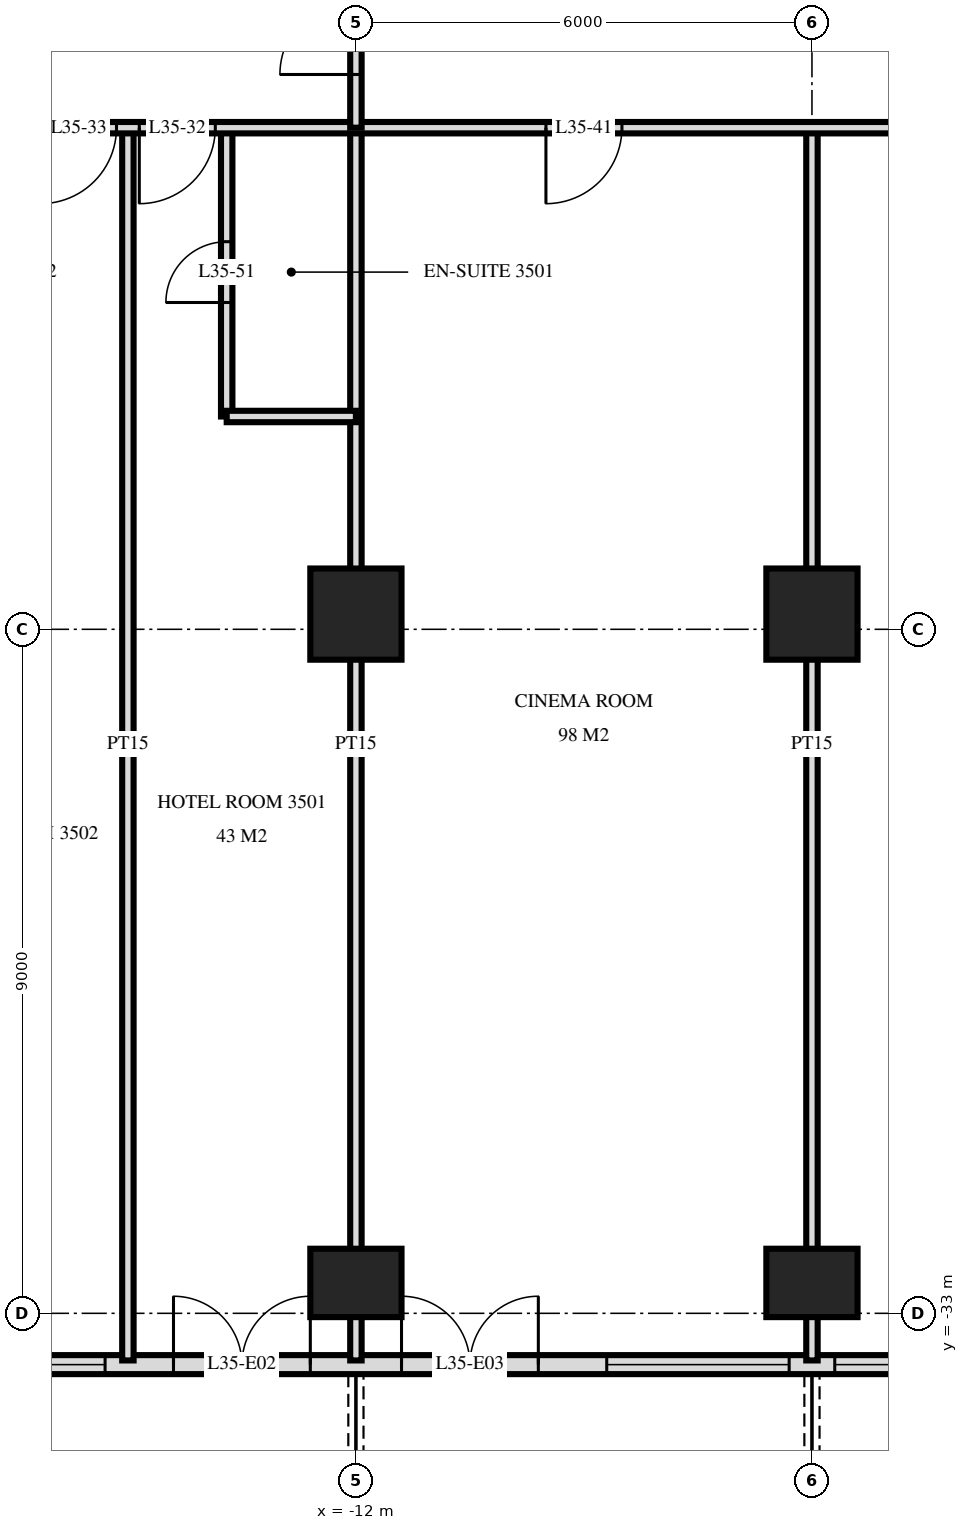
"""IFC4 building model, lengths in metres.
Left out: names, types, materials, properties, quantities, classifications, styles, units other than length and angle.
Written with IfcOpenShell. Run it as: python <this file> out.ifc"""

import sys

from ifc_helpers import new_model, si_unit, direction, frame, frame_2d, origin, origin_2d, place, context, subcontext, project, spatial, rectangle, extrude, element, fill, save


model = new_model("IFC4")
c1 = context("Model", 3, precision=1e-05, world=origin(), true_north=direction((0.0, 1.0)))
c2 = subcontext(c1, "Body", "Model", "MODEL_VIEW")
j1 = project(units=[si_unit("LENGTHUNIT", "METRE"), si_unit("PLANEANGLEUNIT", "RADIAN")], contexts=[c1])
p1 = place(None, origin())
s1 = spatial("IfcSite", under=j1, at=p1, CompositionType="ELEMENT")
p2 = place(p1, origin())
s2 = spatial("IfcBuilding", under=s1, at=p2, CompositionType="ELEMENT")
p3 = place(p2, frame((0.0, 0.0, 138.0)))
s3 = spatial("IfcBuildingStorey", under=s2, at=p3, CompositionType="ELEMENT", Elevation=138.0)
p4 = place(p3, frame((-12.0, -32.6, 0.0), z_axis=(0.0, 0.0, 1.0), x_axis=(1.0, 0.0, 0.0)))
e1 = element("IfcColumn", 1, at=p4, inside=s3, PredefinedType="COLUMN", context=c2, shape_type="SweptSolid", body=[
    extrude(rectangle(XDim=1.2, YDim=0.9, at=origin_2d()), origin(), (0.0, 0.0, 1.0), 3.6),
])
p5 = place(p3, frame((-12.0, -23.8, 0.0), z_axis=(0.0, 0.0, 1.0), x_axis=(1.0, 0.0, 0.0)))
e2 = element("IfcColumn", 2, at=p5, inside=s3, PredefinedType="COLUMN", context=c2, shape_type="SweptSolid", body=[
    extrude(rectangle(XDim=1.2, YDim=1.2, at=origin_2d()), origin(), (0.0, 0.0, 1.0), 3.6),
])
p6 = place(p3, frame((-6.0, -32.6, 0.0), z_axis=(0.0, 0.0, 1.0), x_axis=(1.0, 0.0, 0.0)))
e3 = element("IfcColumn", 3, at=p6, inside=s3, PredefinedType="COLUMN", context=c2, shape_type="SweptSolid", body=[
    extrude(rectangle(XDim=1.2, YDim=0.9, at=origin_2d()), origin(), (0.0, 0.0, 1.0), 3.6),
])
p7 = place(p3, frame((-6.0, -23.8, 0.0), z_axis=(0.0, 0.0, 1.0), x_axis=(1.0, 0.0, 0.0)))
e4 = element("IfcColumn", 4, at=p7, inside=s3, PredefinedType="COLUMN", context=c2, shape_type="SweptSolid", body=[
    extrude(rectangle(XDim=1.2, YDim=1.2, at=origin_2d()), origin(), (0.0, 0.0, 1.0), 3.6),
])
p8 = place(p3, frame((-23.675, -33.675, 0.0), z_axis=(0.0, 0.0, 1.0), x_axis=(1.0, 0.0, 0.0)))
e5 = element("IfcWall", 5, at=p8, inside=s3, PredefinedType="SOLIDWALL", context=c2, shape_type="SweptSolid", body=[
    extrude(rectangle(XDim=47.351, YDim=0.25, at=frame_2d((23.675, 0.0))), origin(), (0.0, 0.0, 1.0), 3.32),
])
p9 = place(p8, frame((0.575, 0.0, 0.0)))
e6 = element("IfcOpeningElement", 6, at=p9, cuts=e5, PredefinedType="OPENING", context=c2, shape_type="SweptSolid", body=[
    extrude(rectangle(XDim=1.8, YDim=2.4, at=frame_2d((0.9, 1.2))), frame((0.0, 0.135, 0.0), z_axis=(0.0, -1.0, 0.0), x_axis=(1.0, 0.0, 0.0)), (0.0, 0.0, 1.0), 0.27),
])
p10 = place(p8, frame((3.425, 0.0, 0.3)))
e7 = element("IfcOpeningElement", 7, at=p10, cuts=e5, PredefinedType="OPENING", context=c2, shape_type="SweptSolid", body=[
    extrude(rectangle(XDim=1.8, YDim=2.1, at=frame_2d((0.9, 1.05))), frame((0.0, 0.135, 0.0), z_axis=(0.0, -1.0, 0.0), x_axis=(1.0, 0.0, 0.0)), (0.0, 0.0, 1.0), 0.27),
])
p11 = place(p8, frame((5.975, 0.0, 0.3)))
e8 = element("IfcOpeningElement", 8, at=p11, cuts=e5, PredefinedType="OPENING", context=c2, shape_type="SweptSolid", body=[
    extrude(rectangle(XDim=2.4, YDim=2.1, at=frame_2d((1.2, 1.05))), frame((0.0, 0.135, 0.0), z_axis=(0.0, -1.0, 0.0), x_axis=(1.0, 0.0, 0.0)), (0.0, 0.0, 1.0), 0.27),
])
p12 = place(p8, frame((9.275, 0.0, 0.0)))
e9 = element("IfcOpeningElement", 9, at=p12, cuts=e5, PredefinedType="OPENING", context=c2, shape_type="SweptSolid", body=[
    extrude(rectangle(XDim=1.8, YDim=2.4, at=frame_2d((0.9, 1.2))), frame((0.0, 0.135, 0.0), z_axis=(0.0, -1.0, 0.0), x_axis=(1.0, 0.0, 0.0)), (0.0, 0.0, 1.0), 0.27),
])
p13 = place(p8, frame((12.275, 0.0, 0.0)))
e10 = element("IfcOpeningElement", 10, at=p13, cuts=e5, PredefinedType="OPENING", context=c2, shape_type="SweptSolid", body=[
    extrude(rectangle(XDim=1.8, YDim=2.4, at=frame_2d((0.9, 1.2))), frame((0.0, 0.135, 0.0), z_axis=(0.0, -1.0, 0.0), x_axis=(1.0, 0.0, 0.0)), (0.0, 0.0, 1.0), 0.27),
])
p14 = place(p8, frame((14.975, 0.0, 0.3)))
e11 = element("IfcOpeningElement", 11, at=p14, cuts=e5, PredefinedType="OPENING", context=c2, shape_type="SweptSolid", body=[
    extrude(rectangle(XDim=2.4, YDim=2.1, at=frame_2d((1.2, 1.05))), frame((0.0, 0.135, 0.0), z_axis=(0.0, -1.0, 0.0), x_axis=(1.0, 0.0, 0.0)), (0.0, 0.0, 1.0), 0.27),
])
p15 = place(p8, frame((17.975, 0.0, 0.3)))
e12 = element("IfcOpeningElement", 12, at=p15, cuts=e5, PredefinedType="OPENING", context=c2, shape_type="SweptSolid", body=[
    extrude(rectangle(XDim=2.4, YDim=2.1, at=frame_2d((1.2, 1.05))), frame((0.0, 0.135, 0.0), z_axis=(0.0, -1.0, 0.0), x_axis=(1.0, 0.0, 0.0)), (0.0, 0.0, 1.0), 0.27),
])
p16 = place(p8, frame((21.275, 0.0, 0.0)))
e13 = element("IfcOpeningElement", 13, at=p16, cuts=e5, PredefinedType="OPENING", context=c2, shape_type="SweptSolid", body=[
    extrude(rectangle(XDim=1.8, YDim=2.4, at=frame_2d((0.9, 1.2))), frame((0.0, 0.135, 0.0), z_axis=(0.0, -1.0, 0.0), x_axis=(1.0, 0.0, 0.0)), (0.0, 0.0, 1.0), 0.27),
])
p17 = place(p8, frame((24.275, 0.0, 0.0)))
e14 = element("IfcOpeningElement", 14, at=p17, cuts=e5, PredefinedType="OPENING", context=c2, shape_type="SweptSolid", body=[
    extrude(rectangle(XDim=1.8, YDim=2.4, at=frame_2d((0.9, 1.2))), frame((0.0, 0.135, 0.0), z_axis=(0.0, -1.0, 0.0), x_axis=(1.0, 0.0, 0.0)), (0.0, 0.0, 1.0), 0.27),
])
p18 = place(p8, frame((26.975, 0.0, 0.3)))
e15 = element("IfcOpeningElement", 15, at=p18, cuts=e5, PredefinedType="OPENING", context=c2, shape_type="SweptSolid", body=[
    extrude(rectangle(XDim=2.4, YDim=2.1, at=frame_2d((1.2, 1.05))), frame((0.0, 0.135, 0.0), z_axis=(0.0, -1.0, 0.0), x_axis=(1.0, 0.0, 0.0)), (0.0, 0.0, 1.0), 0.27),
])
p19 = place(p8, frame((30.275, 0.0, 0.0)))
e16 = element("IfcOpeningElement", 16, at=p19, cuts=e5, PredefinedType="OPENING", context=c2, shape_type="SweptSolid", body=[
    extrude(rectangle(XDim=1.8, YDim=2.4, at=frame_2d((0.9, 1.2))), frame((0.0, 0.135, 0.0), z_axis=(0.0, -1.0, 0.0), x_axis=(1.0, 0.0, 0.0)), (0.0, 0.0, 1.0), 0.27),
])
p20 = place(p8, frame((32.975, 0.0, 0.3)))
e17 = element("IfcOpeningElement", 17, at=p20, cuts=e5, PredefinedType="OPENING", context=c2, shape_type="SweptSolid", body=[
    extrude(rectangle(XDim=2.4, YDim=2.1, at=frame_2d((1.2, 1.05))), frame((0.0, 0.135, 0.0), z_axis=(0.0, -1.0, 0.0), x_axis=(1.0, 0.0, 0.0)), (0.0, 0.0, 1.0), 0.27),
])
p21 = place(p8, frame((36.275, 0.0, 0.0)))
e18 = element("IfcOpeningElement", 18, at=p21, cuts=e5, PredefinedType="OPENING", context=c2, shape_type="SweptSolid", body=[
    extrude(rectangle(XDim=1.8, YDim=2.4, at=frame_2d((0.9, 1.2))), frame((0.0, 0.135, 0.0), z_axis=(0.0, -1.0, 0.0), x_axis=(1.0, 0.0, 0.0)), (0.0, 0.0, 1.0), 0.27),
])
p22 = place(p8, frame((38.975, 0.0, 0.3)))
e19 = element("IfcOpeningElement", 19, at=p22, cuts=e5, PredefinedType="OPENING", context=c2, shape_type="SweptSolid", body=[
    extrude(rectangle(XDim=2.4, YDim=2.1, at=frame_2d((1.2, 1.05))), frame((0.0, 0.135, 0.0), z_axis=(0.0, -1.0, 0.0), x_axis=(1.0, 0.0, 0.0)), (0.0, 0.0, 1.0), 0.27),
])
p23 = place(p8, frame((42.275, 0.0, 0.0)))
e20 = element("IfcOpeningElement", 20, at=p23, cuts=e5, PredefinedType="OPENING", context=c2, shape_type="SweptSolid", body=[
    extrude(rectangle(XDim=1.8, YDim=2.4, at=frame_2d((0.9, 1.2))), frame((0.0, 0.135, 0.0), z_axis=(0.0, -1.0, 0.0), x_axis=(1.0, 0.0, 0.0)), (0.0, 0.0, 1.0), 0.27),
])
p24 = place(p8, frame((45.125, 0.0, 0.3)))
e21 = element("IfcOpeningElement", 21, at=p24, cuts=e5, PredefinedType="OPENING", context=c2, shape_type="SweptSolid", body=[
    extrude(rectangle(XDim=1.8, YDim=2.1, at=frame_2d((0.9, 1.05))), frame((0.0, 0.135, 0.0), z_axis=(0.0, -1.0, 0.0), x_axis=(1.0, 0.0, 0.0)), (0.0, 0.0, 1.0), 0.27),
])
p25 = place(p3, frame((-6.0, -33.62, 0.0), z_axis=(0.0, 0.0, 1.0), x_axis=(0.0, 1.0, 0.0)))
e22 = element("IfcWall", 22, at=p25, inside=s3, PredefinedType="PARTITIONING", context=c2, shape_type="SweptSolid", body=[
    extrude(rectangle(XDim=16.22, YDim=0.15, at=frame_2d((8.11, 0.0))), origin(), (0.0, 0.0, 1.0), 3.32),
])
p26 = place(p3, frame((-12.0, -17.4, 0.0), z_axis=(0.0, 0.0, 1.0), x_axis=(0.0, 1.0, 0.0)))
e23 = element("IfcWall", 23, at=p26, inside=s3, PredefinedType="PARTITIONING", context=c2, shape_type="SweptSolid", body=[
    extrude(rectangle(XDim=2.35, YDim=0.15, at=frame_2d((1.175, 0.0))), origin(), (0.0, 0.0, 1.0), 3.32),
])
p27 = place(p26, frame((0.7, 0.0, 0.0)))
e24 = element("IfcOpeningElement", 24, at=p27, cuts=e23, PredefinedType="OPENING", context=c2, shape_type="SweptSolid", body=[
    extrude(rectangle(XDim=1.0, YDim=2.1, at=frame_2d((0.5, 1.05))), frame((0.0, 0.085, 0.0), z_axis=(0.0, -1.0, 0.0), x_axis=(1.0, 0.0, 0.0)), (0.0, 0.0, 1.0), 0.17),
])
p28 = place(p3, frame((-12.0, -33.62, 0.0), z_axis=(0.0, 0.0, 1.0), x_axis=(0.0, 1.0, 0.0)))
e25 = element("IfcWall", 25, at=p28, inside=s3, PredefinedType="PARTITIONING", context=c2, shape_type="SweptSolid", body=[
    extrude(rectangle(XDim=16.22, YDim=0.15, at=frame_2d((8.11, 0.0))), origin(), (0.0, 0.0, 1.0), 3.32),
])
p29 = place(p3, frame((-13.7, -21.2, 0.0), z_axis=(0.0, 0.0, 1.0), x_axis=(0.0, 1.0, 0.0)))
e26 = element("IfcWall", 26, at=p29, inside=s3, PredefinedType="PARTITIONING", context=c2, shape_type="SweptSolid", body=[
    extrude(rectangle(XDim=3.8, YDim=0.15, at=frame_2d((1.9, 0.0))), origin(), (0.0, 0.0, 1.0), 3.32),
])
p30 = place(p29, frame((1.5, 0.0, 0.0)))
e27 = element("IfcOpeningElement", 27, at=p30, cuts=e26, PredefinedType="OPENING", context=c2, shape_type="SweptSolid", body=[
    extrude(rectangle(XDim=0.8, YDim=2.1, at=frame_2d((0.4, 1.05))), frame((0.0, 0.085, 0.0), z_axis=(0.0, -1.0, 0.0), x_axis=(1.0, 0.0, 0.0)), (0.0, 0.0, 1.0), 0.17),
])
p31 = place(p3, frame((-15.0, -33.62, 0.0), z_axis=(0.0, 0.0, 1.0), x_axis=(0.0, 1.0, 0.0)))
e28 = element("IfcWall", 28, at=p31, inside=s3, PredefinedType="PARTITIONING", context=c2, shape_type="SweptSolid", body=[
    extrude(rectangle(XDim=16.22, YDim=0.15, at=frame_2d((8.11, 0.0))), origin(), (0.0, 0.0, 1.0), 3.32),
])
p32 = place(p3, frame((-13.7, -21.2, 0.0), z_axis=(0.0, 0.0, 1.0), x_axis=(1.0, 0.0, 0.0)))
e29 = element("IfcWall", 29, at=p32, inside=s3, PredefinedType="PARTITIONING", context=c2, shape_type="SweptSolid", body=[
    extrude(rectangle(XDim=1.7, YDim=0.15, at=frame_2d((0.85, 0.0))), origin(), (0.0, 0.0, 1.0), 3.32),
])
p33 = place(p3, frame((-28.02, -17.4, 0.0), z_axis=(0.0, 0.0, 1.0), x_axis=(1.0, 0.0, 0.0)))
e30 = element("IfcWall", 30, at=p33, inside=s3, PredefinedType="PARTITIONING", context=c2, shape_type="SweptSolid", body=[
    extrude(rectangle(XDim=56.04, YDim=0.15, at=frame_2d((28.02, 0.0))), origin(), (0.0, 0.0, 1.0), 3.32),
])
p34 = place(p33, frame((13.17, 0.0, 0.0)))
e31 = element("IfcOpeningElement", 31, at=p34, cuts=e30, PredefinedType="OPENING", context=c2, shape_type="SweptSolid", body=[
    extrude(rectangle(XDim=1.0, YDim=2.1, at=frame_2d((0.5, 1.05))), frame((0.0, 0.085, 0.0), z_axis=(0.0, -1.0, 0.0), x_axis=(1.0, 0.0, 0.0)), (0.0, 0.0, 1.0), 0.17),
])
p35 = place(p33, frame((11.87, 0.0, 0.0)))
e32 = element("IfcOpeningElement", 32, at=p35, cuts=e30, PredefinedType="OPENING", context=c2, shape_type="SweptSolid", body=[
    extrude(rectangle(XDim=1.0, YDim=2.1, at=frame_2d((0.5, 1.05))), frame((0.0, 0.085, 0.0), z_axis=(0.0, -1.0, 0.0), x_axis=(1.0, 0.0, 0.0)), (0.0, 0.0, 1.0), 0.17),
])
p36 = place(p33, frame((2.32, 0.0, 0.0)))
e33 = element("IfcOpeningElement", 33, at=p36, cuts=e30, PredefinedType="OPENING", context=c2, shape_type="SweptSolid", body=[
    extrude(rectangle(XDim=1.0, YDim=2.1, at=frame_2d((0.5, 1.05))), frame((0.0, 0.085, 0.0), z_axis=(0.0, -1.0, 0.0), x_axis=(1.0, 0.0, 0.0)), (0.0, 0.0, 1.0), 0.17),
])
p37 = place(p33, frame((40.17, 0.0, 0.0)))
e34 = element("IfcOpeningElement", 34, at=p37, cuts=e30, PredefinedType="OPENING", context=c2, shape_type="SweptSolid", body=[
    extrude(rectangle(XDim=1.0, YDim=2.1, at=frame_2d((0.5, 1.05))), frame((0.0, 0.085, 0.0), z_axis=(0.0, -1.0, 0.0), x_axis=(1.0, 0.0, 0.0)), (0.0, 0.0, 1.0), 0.17),
])
p38 = place(p33, frame((51.22, 0.0, 0.0)))
e35 = element("IfcOpeningElement", 35, at=p38, cuts=e30, PredefinedType="OPENING", context=c2, shape_type="SweptSolid", body=[
    extrude(rectangle(XDim=1.0, YDim=2.1, at=frame_2d((0.5, 1.05))), frame((0.0, 0.085, 0.0), z_axis=(0.0, -1.0, 0.0), x_axis=(1.0, 0.0, 0.0)), (0.0, 0.0, 1.0), 0.17),
])
p39 = place(p33, frame((18.52, 0.0, 0.0)))
e36 = element("IfcOpeningElement", 36, at=p39, cuts=e30, PredefinedType="OPENING", context=c2, shape_type="SweptSolid", body=[
    extrude(rectangle(XDim=1.0, YDim=2.1, at=frame_2d((0.5, 1.05))), frame((0.0, 0.085, 0.0), z_axis=(0.0, -1.0, 0.0), x_axis=(1.0, 0.0, 0.0)), (0.0, 0.0, 1.0), 0.17),
])
p40 = place(p33, frame((26.02, 0.0, 0.0)))
e37 = element("IfcOpeningElement", 37, at=p40, cuts=e30, PredefinedType="OPENING", context=c2, shape_type="SweptSolid", body=[
    extrude(rectangle(XDim=1.0, YDim=2.1, at=frame_2d((0.5, 1.05))), frame((0.0, 0.085, 0.0), z_axis=(0.0, -1.0, 0.0), x_axis=(1.0, 0.0, 0.0)), (0.0, 0.0, 1.0), 0.17),
])
p41 = place(p33, frame((35.02, 0.0, 0.0)))
e38 = element("IfcOpeningElement", 38, at=p41, cuts=e30, PredefinedType="OPENING", context=c2, shape_type="SweptSolid", body=[
    extrude(rectangle(XDim=1.0, YDim=2.1, at=frame_2d((0.5, 1.05))), frame((0.0, 0.085, 0.0), z_axis=(0.0, -1.0, 0.0), x_axis=(1.0, 0.0, 0.0)), (0.0, 0.0, 1.0), 0.17),
])
p42 = place(p11, origin())
e39 = element("IfcWindow", 39, at=p42, inside=s3, PartitioningType="SINGLE_PANEL", PredefinedType="WINDOW", context=c2, shape_type="SweptSolid", body=[
    extrude(rectangle(XDim=2.4, YDim=2.1, at=frame_2d((1.2, 1.05))), frame((0.0, 0.03, 0.0), z_axis=(0.0, -1.0, 0.0), x_axis=(1.0, 0.0, 0.0)), (0.0, 0.0, 1.0), 0.06),
])
fill(e8, e39)
p43 = place(p12, origin())
e40 = element("IfcDoor", 40, at=p43, inside=s3, OperationType="DOUBLE_DOOR_SINGLE_SWING", PredefinedType="DOOR", context=c2, shape_type="SweptSolid", body=[
    extrude(rectangle(XDim=1.8, YDim=2.4, at=frame_2d((0.9, 1.2))), frame((0.0, 0.025, 0.0), z_axis=(0.0, -1.0, 0.0), x_axis=(1.0, 0.0, 0.0)), (0.0, 0.0, 1.0), 0.05),
])
fill(e9, e40)
p44 = place(p13, origin())
e41 = element("IfcDoor", 41, at=p44, inside=s3, OperationType="DOUBLE_DOOR_SINGLE_SWING", PredefinedType="DOOR", context=c2, shape_type="SweptSolid", body=[
    extrude(rectangle(XDim=1.8, YDim=2.4, at=frame_2d((0.9, 1.2))), frame((0.0, 0.025, 0.0), z_axis=(0.0, -1.0, 0.0), x_axis=(1.0, 0.0, 0.0)), (0.0, 0.0, 1.0), 0.05),
])
fill(e10, e41)
p45 = place(p14, origin())
e42 = element("IfcWindow", 42, at=p45, inside=s3, PartitioningType="SINGLE_PANEL", PredefinedType="WINDOW", context=c2, shape_type="SweptSolid", body=[
    extrude(rectangle(XDim=2.4, YDim=2.1, at=frame_2d((1.2, 1.05))), frame((0.0, 0.03, 0.0), z_axis=(0.0, -1.0, 0.0), x_axis=(1.0, 0.0, 0.0)), (0.0, 0.0, 1.0), 0.06),
])
fill(e11, e42)
p46 = place(p15, origin())
e43 = element("IfcWindow", 43, at=p46, inside=s3, PartitioningType="SINGLE_PANEL", PredefinedType="WINDOW", context=c2, shape_type="SweptSolid", body=[
    extrude(rectangle(XDim=2.4, YDim=2.1, at=frame_2d((1.2, 1.05))), frame((0.0, 0.03, 0.0), z_axis=(0.0, -1.0, 0.0), x_axis=(1.0, 0.0, 0.0)), (0.0, 0.0, 1.0), 0.06),
])
fill(e12, e43)
p47 = place(p27, origin())
e44 = element("IfcDoor", 44, at=p47, inside=s3, OperationType="SINGLE_SWING_RIGHT", PredefinedType="DOOR", context=c2, shape_type="SweptSolid", body=[
    extrude(rectangle(XDim=1.0, YDim=2.1, at=frame_2d((0.5, 1.05))), frame((0.0, 0.025, 0.0), z_axis=(0.0, -1.0, 0.0), x_axis=(1.0, 0.0, 0.0)), (0.0, 0.0, 1.0), 0.05),
])
fill(e24, e44)
p48 = place(p34, frame((0.5, 0.0, 0.0), z_axis=(0.0, 0.0, 1.0), x_axis=(-1.0, 0.0, 0.0)))
e45 = element("IfcDoor", 45, at=p48, inside=s3, OperationType="SINGLE_SWING_LEFT", PredefinedType="DOOR", context=c2, shape_type="SweptSolid", body=[
    extrude(rectangle(XDim=1.0, YDim=2.1, at=frame_2d((0.0, 1.05))), frame((0.0, -0.025, 0.0), z_axis=(0.0, 1.0, 0.0), x_axis=(-1.0, 0.0, 0.0)), (0.0, 0.0, 1.0), 0.05),
])
fill(e31, e45)
p49 = place(p35, frame((0.5, 0.0, 0.0), z_axis=(0.0, 0.0, 1.0), x_axis=(-1.0, 0.0, 0.0)))
e46 = element("IfcDoor", 46, at=p49, inside=s3, OperationType="SINGLE_SWING_LEFT", PredefinedType="DOOR", context=c2, shape_type="SweptSolid", body=[
    extrude(rectangle(XDim=1.0, YDim=2.1, at=frame_2d((0.0, 1.05))), frame((0.0, -0.025, 0.0), z_axis=(0.0, 1.0, 0.0), x_axis=(-1.0, 0.0, 0.0)), (0.0, 0.0, 1.0), 0.05),
])
fill(e32, e46)
p50 = place(p39, frame((0.5, 0.0, 0.0), z_axis=(0.0, 0.0, 1.0), x_axis=(-1.0, 0.0, 0.0)))
e47 = element("IfcDoor", 47, at=p50, inside=s3, OperationType="SINGLE_SWING_LEFT", PredefinedType="DOOR", context=c2, shape_type="SweptSolid", body=[
    extrude(rectangle(XDim=1.0, YDim=2.1, at=frame_2d((0.0, 1.05))), frame((0.0, -0.025, 0.0), z_axis=(0.0, 1.0, 0.0), x_axis=(-1.0, 0.0, 0.0)), (0.0, 0.0, 1.0), 0.05),
])
fill(e36, e47)
p51 = place(p30, origin())
e48 = element("IfcDoor", 48, at=p51, inside=s3, OperationType="SINGLE_SWING_RIGHT", PredefinedType="DOOR", context=c2, shape_type="SweptSolid", body=[
    extrude(rectangle(XDim=0.8, YDim=2.1, at=frame_2d((0.4, 1.05))), frame((0.0, 0.025, 0.0), z_axis=(0.0, -1.0, 0.0), x_axis=(1.0, 0.0, 0.0)), (0.0, 0.0, 1.0), 0.05),
])
fill(e27, e48)
save(model, sys.argv[1])
